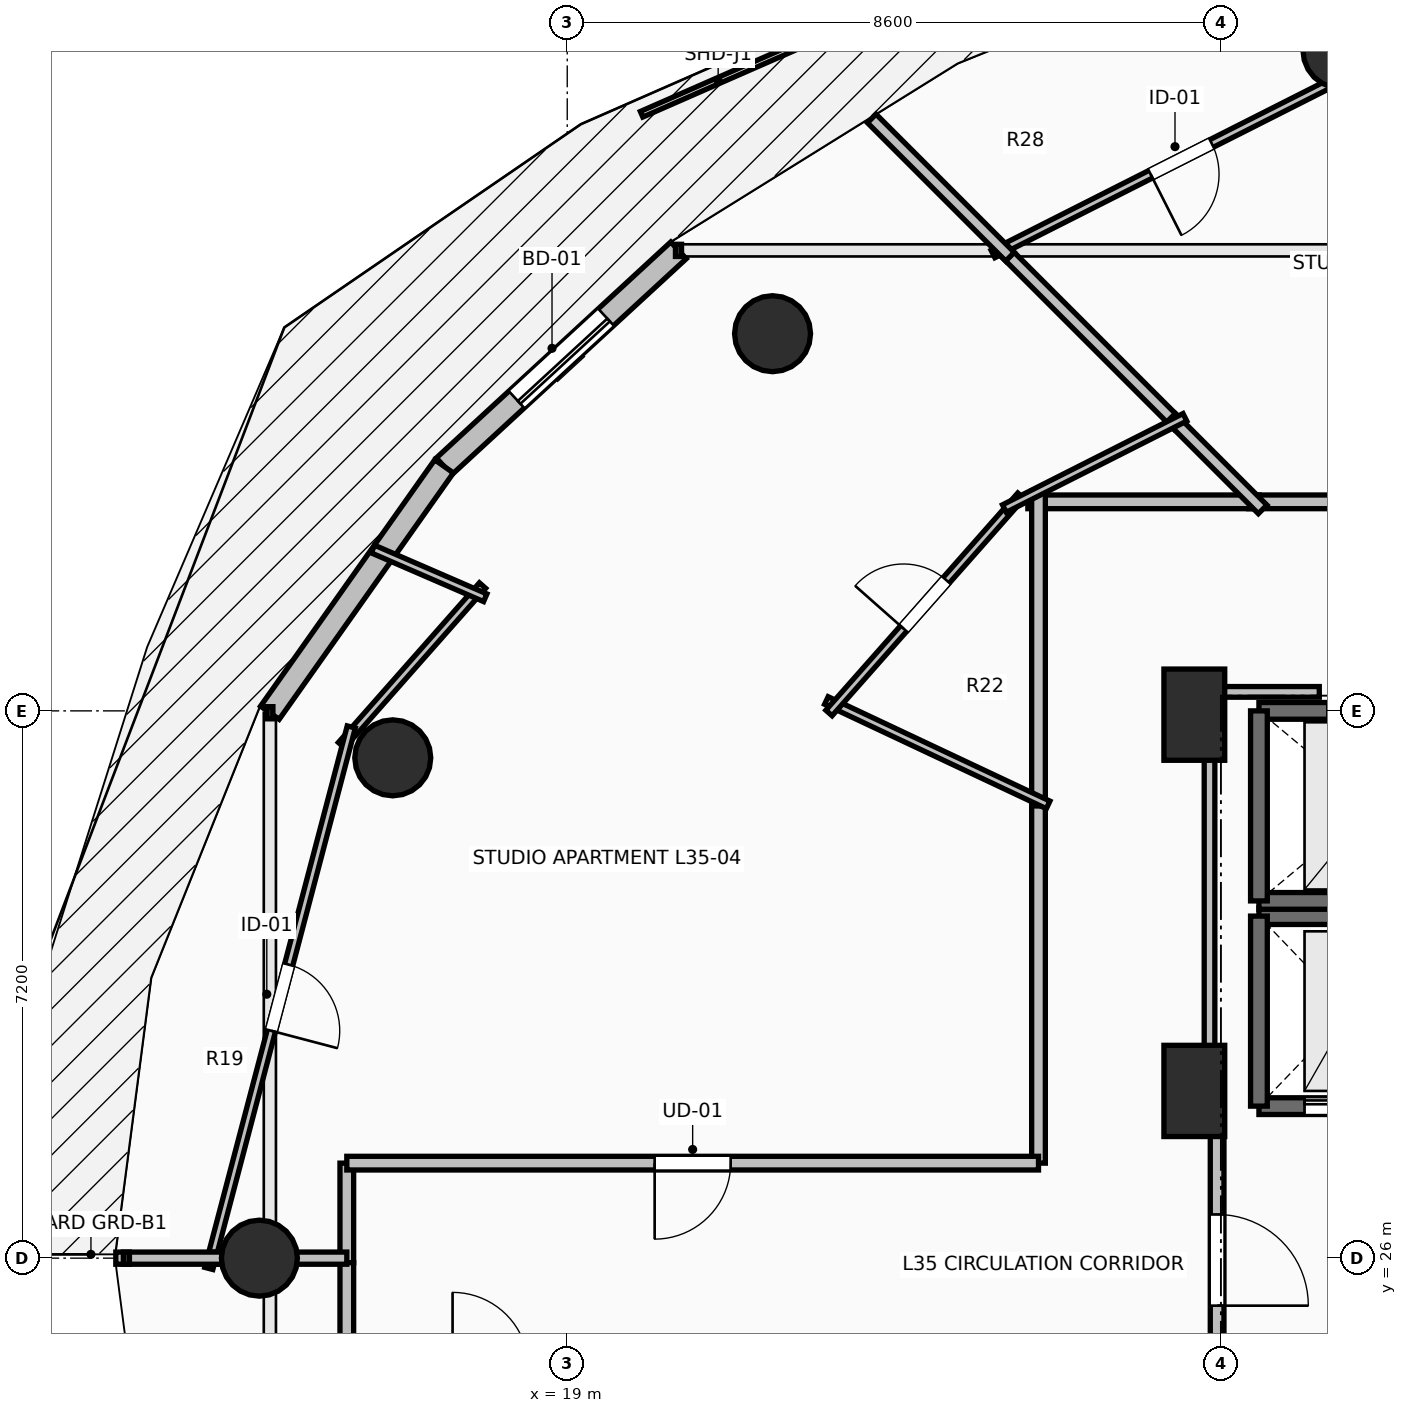
"""IFC4 building model, lengths in metres.
Left out: names, types, materials, properties, quantities, classifications, styles, units other than length and angle.
Written with IfcOpenShell. Run it as: python <this file> out.ifc"""

import sys

from ifc_helpers import new_model, si_unit, direction, frame, frame_2d, origin, origin_2d, place, context, subcontext, project, spatial, rectangle, circle, extrude, element, fill, save


model = new_model("IFC4")
c1 = context("Model", 3, precision=1e-05, world=origin(), true_north=direction((0.0, 1.0)))
c2 = subcontext(c1, "Body", "Model", "MODEL_VIEW")
j1 = project(units=[si_unit("LENGTHUNIT", "METRE"), si_unit("PLANEANGLEUNIT", "RADIAN")], contexts=[c1])
p1 = place(None, origin())
s1 = spatial("IfcSite", under=j1, at=p1, CompositionType="ELEMENT")
p2 = place(p1, origin())
s2 = spatial("IfcBuilding", under=s1, at=p2, CompositionType="ELEMENT")
p3 = place(p2, frame((0.0, 0.0, 132.6)))
s3 = spatial("IfcBuildingStorey", under=s2, at=p3, CompositionType="ELEMENT", Elevation=132.6)
for number, where, z_axis, x_axis in (
    (1, (29.179, 41.891, 0.0), (0.0, 0.0, 1.0), (-0.383, 0.924, 0.0)),
    (2, (21.701, 38.162, 0.0), (0.0, 0.0, 1.0), (-0.707, 0.707, 0.0)),
    (3, (16.705, 32.582, 0.0), (0.0, 0.0, 1.0), (-0.924, 0.383, 0.0)),
    (4, (14.95, 26.0, 0.0), (0.0, 0.0, 1.0), (-1.0, 0.0, 0.0)),
):
    element("IfcColumn", number, at=place(p3, frame(where, z_axis=z_axis, x_axis=x_axis)), inside=s3, PredefinedType="COLUMN", context=c2, shape_type="SweptSolid", body=[
        extrude(circle(Radius=0.5, at=origin_2d()), origin(), (0.0, 0.0, 1.0), 3.5),
    ])
for number, where, z_axis, x_axis in (
    (5, (27.25, 28.2, 0.0), (0.0, 0.0, 1.0), (1.0, 0.0, 0.0)),
    (6, (27.25, 33.15, 0.0), (0.0, 0.0, 1.0), (1.0, 0.0, 0.0)),
):
    element("IfcColumn", number, at=place(p3, frame(where, z_axis=z_axis, x_axis=x_axis)), inside=s3, PredefinedType="PILASTER", context=c2, shape_type="SweptSolid", body=[
        extrude(rectangle(XDim=0.8, YDim=1.2, at=origin_2d()), origin(), (0.0, 0.0, 1.0), 3.5),
    ])
p4 = place(p3, frame((20.464, 39.258, 0.0), z_axis=(0.0, 0.0, 1.0), x_axis=(-0.735477154165, -0.677549522693, 0.0)))
e7 = element("IfcWall", 7, at=p4, inside=s3, PredefinedType="STANDARD", context=c2, shape_type="SweptSolid", body=[
    extrude(rectangle(XDim=4.194, YDim=0.3, at=frame_2d((2.097, 0.0))), origin(), (0.0, 0.0, 1.0), 3.24),
])
p5 = place(p4, frame((1.297, 0.0, 0.0)))
e8 = element("IfcOpeningElement", 8, at=p5, cuts=e7, PredefinedType="OPENING", context=c2, shape_type="SweptSolid", body=[
    extrude(rectangle(XDim=1.6, YDim=2.3, at=frame_2d((0.8, 1.15))), frame((0.0, 0.165, 0.0), z_axis=(0.0, -1.0, 0.0), x_axis=(1.0, 0.0, 0.0)), (0.0, 0.0, 1.0), 0.33),
])
p6 = place(p3, frame((17.38, 36.417, 0.0), z_axis=(0.0, 0.0, 1.0), x_axis=(-0.577269753207, -0.816553508371, 0.0)))
e9 = element("IfcWall", 9, at=p6, inside=s3, PredefinedType="STANDARD", context=c2, shape_type="SweptSolid", body=[
    extrude(rectangle(XDim=3.97, YDim=0.3, at=frame_2d((1.985, 0.0))), origin(), (0.0, 0.0, 1.0), 3.24),
])
p7 = place(p3, frame((28.1, 28.0, 0.0), z_axis=(0.0, 0.0, 1.0), x_axis=(1.0, 0.0, 0.0)))
e10 = element("IfcWall", 10, at=p7, inside=s3, PredefinedType="SHEAR", context=c2, shape_type="SweptSolid", body=[
    extrude(rectangle(XDim=2.4, YDim=0.22, at=frame_2d((1.2, 0.0))), origin(), (0.0, 0.0, 1.0), 3.24),
])
p8 = place(p7, frame((0.6, 0.0, 0.0)))
e11 = element("IfcOpeningElement", 11, at=p8, cuts=e10, PredefinedType="OPENING", context=c2, shape_type="SweptSolid", body=[
    extrude(rectangle(XDim=1.2, YDim=2.2, at=frame_2d((0.6, 1.1))), frame((0.0, 0.125, 0.0), z_axis=(0.0, -1.0, 0.0), x_axis=(1.0, 0.0, 0.0)), (0.0, 0.0, 1.0), 0.25),
])
p9 = place(p3, frame((30.5, 30.5, 0.0), z_axis=(0.0, 0.0, 1.0), x_axis=(-1.0, 0.0, 0.0)))
e12 = element("IfcWall", 12, at=p9, inside=s3, PredefinedType="SHEAR", context=c2, shape_type="SweptSolid", body=[
    extrude(rectangle(XDim=2.4, YDim=0.22, at=frame_2d((1.2, 0.0))), origin(), (0.0, 0.0, 1.0), 3.24),
])
p10 = place(p3, frame((28.1, 30.5, 0.0), z_axis=(0.0, 0.0, 1.0), x_axis=(0.0, -1.0, 0.0)))
e13 = element("IfcWall", 13, at=p10, inside=s3, PredefinedType="SHEAR", context=c2, shape_type="SweptSolid", body=[
    extrude(rectangle(XDim=2.5, YDim=0.22, at=frame_2d((1.25, 0.0))), origin(), (0.0, 0.0, 1.0), 3.24),
])
p11 = place(p3, frame((28.1, 30.7, 0.0), z_axis=(0.0, 0.0, 1.0), x_axis=(1.0, 0.0, 0.0)))
e14 = element("IfcWall", 14, at=p11, inside=s3, PredefinedType="SOLIDWALL", context=c2, shape_type="SweptSolid", body=[
    extrude(rectangle(XDim=3.0, YDim=0.22, at=frame_2d((1.5, 0.0))), origin(), (0.0, 0.0, 1.0), 3.24),
])
p12 = place(p3, frame((31.1, 33.2, 0.0), z_axis=(0.0, 0.0, 1.0), x_axis=(-1.0, 0.0, 0.0)))
e15 = element("IfcWall", 15, at=p12, inside=s3, PredefinedType="SOLIDWALL", context=c2, shape_type="SweptSolid", body=[
    extrude(rectangle(XDim=3.0, YDim=0.22, at=frame_2d((1.5, 0.0))), origin(), (0.0, 0.0, 1.0), 3.24),
])
p13 = place(p12, frame((0.9, 0.0, 0.0)))
e16 = element("IfcOpeningElement", 16, at=p13, cuts=e15, PredefinedType="OPENING", context=c2, shape_type="SweptSolid", body=[
    extrude(rectangle(XDim=1.2, YDim=2.2, at=frame_2d((0.6, 1.1))), frame((0.0, 0.125, 0.0), z_axis=(0.0, -1.0, 0.0), x_axis=(1.0, 0.0, 0.0)), (0.0, 0.0, 1.0), 0.25),
])
p14 = place(p3, frame((28.1, 33.2, 0.0), z_axis=(0.0, 0.0, 1.0), x_axis=(0.0, -1.0, 0.0)))
e17 = element("IfcWall", 17, at=p14, inside=s3, PredefinedType="SOLIDWALL", context=c2, shape_type="SweptSolid", body=[
    extrude(rectangle(XDim=2.5, YDim=0.22, at=frame_2d((1.25, 0.0))), origin(), (0.0, 0.0, 1.0), 3.24),
])
p15 = place(p3, frame((27.55, 28.0, 0.0), z_axis=(0.0, 0.0, 1.0), x_axis=(0.0, -1.0, 0.0)))
e18 = element("IfcWall", 18, at=p15, inside=s3, PredefinedType="PARTITIONING", context=c2, shape_type="SweptSolid", body=[
    extrude(rectangle(XDim=4.05, YDim=0.18, at=frame_2d((2.025, 0.0))), origin(), (0.0, 0.0, 1.0), 3.24),
])
p16 = place(p15, frame((1.425, 0.0, 0.0)))
e19 = element("IfcOpeningElement", 19, at=p16, cuts=e18, PredefinedType="OPENING", context=c2, shape_type="SweptSolid", body=[
    extrude(rectangle(XDim=1.2, YDim=2.15, at=frame_2d((0.6, 1.075))), frame((0.0, 0.105, 0.0), z_axis=(0.0, -1.0, 0.0), x_axis=(1.0, 0.0, 0.0)), (0.0, 0.0, 1.0), 0.21),
])
p17 = place(p3, frame((34.478, 35.95, 0.0), z_axis=(0.0, 0.0, 1.0), x_axis=(-1.0, 0.0, 0.0)))
e20 = element("IfcWall", 20, at=p17, inside=s3, PredefinedType="PARTITIONING", context=c2, shape_type="SweptSolid", body=[
    extrude(rectangle(XDim=6.513, YDim=0.18, at=frame_2d((3.256, 0.0))), origin(), (0.0, 0.0, 1.0), 2.432),
])
p18 = place(p17, frame((2.757, 0.0, 0.0)))
e21 = element("IfcOpeningElement", 21, at=p18, cuts=e20, PredefinedType="OPENING", context=c2, shape_type="SweptSolid", body=[
    extrude(rectangle(XDim=1.0, YDim=2.15, at=frame_2d((0.5, 1.075))), frame((0.0, 0.105, 0.0), z_axis=(0.0, -1.0, 0.0), x_axis=(1.0, 0.0, 0.0)), (0.0, 0.0, 1.0), 0.21),
])
p19 = place(p3, frame((16.1, 27.25, 0.0), z_axis=(0.0, 0.0, 1.0), x_axis=(0.0, -1.0, 0.0)))
e22 = element("IfcWall", 22, at=p19, inside=s3, PredefinedType="PARTITIONING", context=c2, shape_type="SweptSolid", body=[
    extrude(rectangle(XDim=1.31, YDim=0.18, at=frame_2d((0.655, 0.0))), origin(), (0.0, 0.0, 1.0), 2.432),
])
p20 = place(p3, frame((25.2, 32.089, 0.0), z_axis=(0.0, 0.0, 1.0), x_axis=(0.0, -1.0, 0.0)))
e23 = element("IfcWall", 23, at=p20, inside=s3, PredefinedType="PARTITIONING", context=c2, shape_type="SweptSolid", body=[
    extrude(rectangle(XDim=4.839, YDim=0.18, at=frame_2d((2.419, 0.0))), origin(), (0.0, 0.0, 1.0), 2.432),
])
p21 = place(p3, frame((25.2, 27.25, 0.0), z_axis=(0.0, 0.0, 1.0), x_axis=(-1.0, 0.0, 0.0)))
e24 = element("IfcWall", 24, at=p21, inside=s3, PredefinedType="PARTITIONING", context=c2, shape_type="SweptSolid", body=[
    extrude(rectangle(XDim=9.1, YDim=0.18, at=frame_2d((4.55, 0.0))), origin(), (0.0, 0.0, 1.0), 2.432),
])
p22 = place(p21, frame((4.05, 0.0, 0.0)))
e25 = element("IfcOpeningElement", 25, at=p22, cuts=e24, PredefinedType="OPENING", context=c2, shape_type="SweptSolid", body=[
    extrude(rectangle(XDim=1.0, YDim=2.15, at=frame_2d((0.5, 1.075))), frame((0.0, 0.105, 0.0), z_axis=(0.0, -1.0, 0.0), x_axis=(1.0, 0.0, 0.0)), (0.0, 0.0, 1.0), 0.21),
])
p23 = place(p3, frame((28.105, 35.95, 0.0), z_axis=(0.0, 0.0, 1.0), x_axis=(-1.0, 0.0, 0.0)))
e26 = element("IfcWall", 26, at=p23, inside=s3, PredefinedType="PARTITIONING", context=c2, shape_type="SweptSolid", body=[
    extrude(rectangle(XDim=3.045, YDim=0.18, at=frame_2d((1.522, 0.0))), origin(), (0.0, 0.0, 1.0), 2.432),
])
p24 = place(p3, frame((25.2, 36.09, 0.0), z_axis=(0.0, 0.0, 1.0), x_axis=(0.0, -1.0, 0.0)))
e27 = element("IfcWall", 27, at=p24, inside=s3, PredefinedType="PARTITIONING", context=c2, shape_type="SweptSolid", body=[
    extrude(rectangle(XDim=4.141, YDim=0.18, at=frame_2d((2.071, 0.0))), origin(), (0.0, 0.0, 1.0), 2.432),
])
p25 = place(p3, frame((16.1, 25.94, 0.0), z_axis=(0.0, 0.0, 1.0), x_axis=(0.0, -1.0, 0.0)))
e28 = element("IfcWall", 28, at=p25, inside=s3, PredefinedType="PARTITIONING", context=c2, shape_type="SweptSolid", body=[
    extrude(rectangle(XDim=1.39, YDim=0.18, at=frame_2d((0.695, 0.0))), origin(), (0.0, 0.0, 1.0), 2.432),
])
p26 = place(p3, frame((29.553, 41.714, 0.0), z_axis=(0.0, 0.0, 1.0), x_axis=(-0.892438454993, -0.451169152369, 0.0)))
e29 = element("IfcWall", 29, at=p26, inside=s3, PredefinedType="PARTITIONING", context=c2, shape_type="SweptSolid", body=[
    extrude(rectangle(XDim=5.549, YDim=0.11, at=frame_2d((2.774, 0.0))), origin(), (0.0, 0.0, 1.0), 2.432),
])
p27 = place(p26, frame((2.324, 0.0, 0.0)))
e30 = element("IfcOpeningElement", 30, at=p27, cuts=e29, PredefinedType="OPENING", context=c2, shape_type="SweptSolid", body=[
    extrude(rectangle(XDim=0.9, YDim=2.1, at=frame_2d((0.45, 1.05))), frame((0.0, 0.07, 0.0), z_axis=(0.0, -1.0, 0.0), x_axis=(1.0, 0.0, 0.0)), (0.0, 0.0, 1.0), 0.14),
])
p28 = place(p3, frame((24.726, 39.274, 0.0), z_axis=(0.0, 0.0, 1.0), x_axis=(0.707106781187, -0.707106781187, 0.0)))
e31 = element("IfcWall", 31, at=p28, inside=s3, PredefinedType="PARTITIONING", context=c2, shape_type="SweptSolid", body=[
    extrude(rectangle(XDim=3.277, YDim=0.16, at=frame_2d((1.638, 0.0))), origin(), (0.0, 0.0, 1.0), 2.874),
])
p29 = place(p3, frame((26.944, 37.056, 0.0), z_axis=(0.0, 0.0, 1.0), x_axis=(0.707106781187, -0.707106781187, 0.0)))
e32 = element("IfcWall", 32, at=p29, inside=s3, PredefinedType="PARTITIONING", context=c2, shape_type="SweptSolid", body=[
    extrude(rectangle(XDim=1.704, YDim=0.16, at=frame_2d((0.852, 0.0))), origin(), (0.0, 0.0, 1.0), 2.432),
])
p30 = place(p3, frame((23.006, 40.994, 0.0), z_axis=(0.0, 0.0, 1.0), x_axis=(0.707106781187, -0.707106781187, 0.0)))
e33 = element("IfcWall", 33, at=p30, inside=s3, PredefinedType="PARTITIONING", context=c2, shape_type="SweptSolid", body=[
    extrude(rectangle(XDim=2.572, YDim=0.16, at=frame_2d((1.286, 0.0))), origin(), (0.0, 0.0, 1.0), 2.728),
])
p31 = place(p3, frame((25.327, 31.963, 0.0), z_axis=(0.0, 0.0, 1.0), x_axis=(-0.904775800467, 0.425888190596, 0.0)))
e34 = element("IfcWall", 34, at=p31, inside=s3, PredefinedType="PARTITIONING", context=c2, shape_type="SweptSolid", body=[
    extrude(rectangle(XDim=3.225, YDim=0.11, at=frame_2d((1.612, 0.0))), origin(), (0.0, 0.0, 1.0), 2.922),
])
p32 = place(p3, frame((22.443, 33.172, 0.0), z_axis=(0.0, 0.0, 1.0), x_axis=(0.662199468358, 0.749327607997, 0.0)))
e35 = element("IfcWall", 35, at=p32, inside=s3, PredefinedType="PARTITIONING", context=c2, shape_type="SweptSolid", body=[
    extrude(rectangle(XDim=3.814, YDim=0.11, at=frame_2d((1.907, 0.0))), origin(), (0.0, 0.0, 1.0), 2.432),
])
p33 = place(p32, frame((1.482, 0.0, 0.0)))
e36 = element("IfcOpeningElement", 36, at=p33, cuts=e35, PredefinedType="OPENING", context=c2, shape_type="SweptSolid", body=[
    extrude(rectangle(XDim=0.85, YDim=2.1, at=frame_2d((0.425, 1.05))), frame((0.0, 0.07, 0.0), z_axis=(0.0, -1.0, 0.0), x_axis=(1.0, 0.0, 0.0)), (0.0, 0.0, 1.0), 0.14),
])
p34 = place(p3, frame((24.751, 35.862, 0.0), z_axis=(0.0, 0.0, 1.0), x_axis=(0.892455114256, 0.451136197882, 0.0)))
e37 = element("IfcWall", 37, at=p34, inside=s3, PredefinedType="PARTITIONING", context=c2, shape_type="SweptSolid", body=[
    extrude(rectangle(XDim=2.661, YDim=0.11, at=frame_2d((1.331, 0.0))), origin(), (0.0, 0.0, 1.0), 3.24),
])
p35 = place(p3, frame((17.886, 34.849, 0.0), z_axis=(0.0, 0.0, 1.0), x_axis=(-0.661981664989, -0.749520029898, 0.0)))
e38 = element("IfcWall", 38, at=p35, inside=s3, PredefinedType="PARTITIONING", context=c2, shape_type="SweptSolid", body=[
    extrude(rectangle(XDim=2.803, YDim=0.11, at=frame_2d((1.401, 0.0))), origin(), (0.0, 0.0, 1.0), 3.24),
])
p36 = place(p3, frame((16.159, 32.988, 0.0), z_axis=(0.0, 0.0, 1.0), x_axis=(-0.254441093922, -0.967088274008, 0.0)))
e39 = element("IfcWall", 39, at=p36, inside=s3, PredefinedType="PARTITIONING", context=c2, shape_type="SweptSolid", body=[
    extrude(rectangle(XDim=7.366, YDim=0.11, at=frame_2d((3.683, 0.0))), origin(), (0.0, 0.0, 1.0), 3.24),
])
p37 = place(p36, frame((3.233, 0.0, 0.0)))
e40 = element("IfcOpeningElement", 40, at=p37, cuts=e39, PredefinedType="OPENING", context=c2, shape_type="SweptSolid", body=[
    extrude(rectangle(XDim=0.9, YDim=2.1, at=frame_2d((0.45, 1.05))), frame((0.0, 0.07, 0.0), z_axis=(0.0, -1.0, 0.0), x_axis=(1.0, 0.0, 0.0)), (0.0, 0.0, 1.0), 0.14),
])
p38 = place(p3, frame((16.444, 35.329, 0.0), z_axis=(0.0, 0.0, 1.0), x_axis=(0.917553781871, -0.397611691698, 0.0)))
e41 = element("IfcWall", 41, at=p38, inside=s3, PredefinedType="PARTITIONING", context=c2, shape_type="SweptSolid", body=[
    extrude(rectangle(XDim=1.611, YDim=0.11, at=frame_2d((0.805, 0.0))), origin(), (0.0, 0.0, 1.0), 3.24),
])
p39 = place(p3, frame((14.32, 26.0, 0.0), z_axis=(0.0, 0.0, 1.0), x_axis=(1.0, 0.0, 0.0)))
e42 = element("IfcWall", 42, at=p39, inside=s3, PredefinedType="PARTITIONING", context=c2, shape_type="SweptSolid", body=[
    extrude(rectangle(XDim=1.78, YDim=0.16, at=frame_2d((0.89, 0.0))), origin(), (0.0, 0.0, 1.0), 2.432),
])
p40 = place(p3, frame((13.061, 26.0, 0.0), z_axis=(0.0, 0.0, 1.0), x_axis=(1.0, 0.0, 0.0)))
e43 = element("IfcWall", 43, at=p40, inside=s3, PredefinedType="PARTITIONING", context=c2, shape_type="SweptSolid", body=[
    extrude(rectangle(XDim=1.399, YDim=0.16, at=frame_2d((0.699, 0.0))), origin(), (0.0, 0.0, 1.0), 3.24),
])
p41 = place(p3, frame((28.894, 33.45, 0.0), z_axis=(0.0, 0.0, 1.0), x_axis=(-1.0, 0.0, 0.0)))
e44 = element("IfcWall", 44, at=p41, inside=s3, PredefinedType="PARTITIONING", context=c2, shape_type="SweptSolid", body=[
    extrude(rectangle(XDim=1.444, YDim=0.14, at=frame_2d((0.722, 0.0))), origin(), (0.0, 0.0, 1.0), 2.432),
])
p42 = place(p3, frame((27.45, 33.45, 0.0), z_axis=(0.0, 0.0, 1.0), x_axis=(0.0, -1.0, 0.0)))
e45 = element("IfcWall", 45, at=p42, inside=s3, PredefinedType="PARTITIONING", context=c2, shape_type="SweptSolid", body=[
    extrude(rectangle(XDim=5.254, YDim=0.14, at=frame_2d((2.627, 0.0))), origin(), (0.0, 0.0, 1.0), 2.432),
])
p43 = place(p5, origin())
e46 = element("IfcDoor", 46, at=p43, inside=s3, OperationType="SLIDING_TO_LEFT", PredefinedType="DOOR", context=c2, shape_type="SweptSolid", body=[
    extrude(rectangle(XDim=1.6, YDim=2.3, at=frame_2d((0.8, 1.15))), frame((0.0, 0.025, 0.0), z_axis=(0.0, -1.0, 0.0), x_axis=(1.0, 0.0, 0.0)), (0.0, 0.0, 1.0), 0.05),
])
fill(e8, e46)
p44 = place(p8, origin())
e47 = element("IfcDoor", 47, at=p44, inside=s3, OperationType="SLIDING_TO_LEFT", PredefinedType="DOOR", context=c2, shape_type="SweptSolid", body=[
    extrude(rectangle(XDim=1.2, YDim=2.2, at=frame_2d((0.6, 1.1))), frame((0.0, 0.025, 0.0), z_axis=(0.0, -1.0, 0.0), x_axis=(1.0, 0.0, 0.0)), (0.0, 0.0, 1.0), 0.05),
])
fill(e11, e47)
p45 = place(p13, origin())
e48 = element("IfcDoor", 48, at=p45, inside=s3, OperationType="SLIDING_TO_LEFT", PredefinedType="DOOR", context=c2, shape_type="SweptSolid", body=[
    extrude(rectangle(XDim=1.2, YDim=2.2, at=frame_2d((0.6, 1.1))), frame((0.0, 0.025, 0.0), z_axis=(0.0, -1.0, 0.0), x_axis=(1.0, 0.0, 0.0)), (0.0, 0.0, 1.0), 0.05),
])
fill(e16, e48)
p46 = place(p16, origin())
e49 = element("IfcDoor", 49, at=p46, inside=s3, OperationType="SINGLE_SWING_RIGHT", PredefinedType="DOOR", context=c2, shape_type="SweptSolid", body=[
    extrude(rectangle(XDim=1.2, YDim=2.15, at=frame_2d((0.6, 1.075))), frame((0.0, 0.025, 0.0), z_axis=(0.0, -1.0, 0.0), x_axis=(1.0, 0.0, 0.0)), (0.0, 0.0, 1.0), 0.05),
])
fill(e19, e49)
p47 = place(p22, origin())
e50 = element("IfcDoor", 50, at=p47, inside=s3, OperationType="SINGLE_SWING_RIGHT", PredefinedType="DOOR", context=c2, shape_type="SweptSolid", body=[
    extrude(rectangle(XDim=1.0, YDim=2.15, at=frame_2d((0.5, 1.075))), frame((0.0, 0.025, 0.0), z_axis=(0.0, -1.0, 0.0), x_axis=(1.0, 0.0, 0.0)), (0.0, 0.0, 1.0), 0.05),
])
fill(e25, e50)
p48 = place(p27, origin())
e51 = element("IfcDoor", 51, at=p48, inside=s3, OperationType="SINGLE_SWING_RIGHT", PredefinedType="DOOR", context=c2, shape_type="SweptSolid", body=[
    extrude(rectangle(XDim=0.9, YDim=2.1, at=frame_2d((0.45, 1.05))), frame((0.0, 0.025, 0.0), z_axis=(0.0, -1.0, 0.0), x_axis=(1.0, 0.0, 0.0)), (0.0, 0.0, 1.0), 0.05),
])
fill(e30, e51)
p49 = place(p33, origin())
e52 = element("IfcDoor", 52, at=p49, inside=s3, OperationType="SINGLE_SWING_LEFT", PredefinedType="DOOR", context=c2, shape_type="SweptSolid", body=[
    extrude(rectangle(XDim=0.85, YDim=2.1, at=frame_2d((0.425, 1.05))), frame((0.0, 0.025, 0.0), z_axis=(0.0, -1.0, 0.0), x_axis=(1.0, 0.0, 0.0)), (0.0, 0.0, 1.0), 0.05),
])
fill(e36, e52)
p50 = place(p37, origin())
e53 = element("IfcDoor", 53, at=p50, inside=s3, OperationType="SINGLE_SWING_RIGHT", PredefinedType="DOOR", context=c2, shape_type="SweptSolid", body=[
    extrude(rectangle(XDim=0.9, YDim=2.1, at=frame_2d((0.45, 1.05))), frame((0.0, 0.025, 0.0), z_axis=(0.0, -1.0, 0.0), x_axis=(1.0, 0.0, 0.0)), (0.0, 0.0, 1.0), 0.05),
])
fill(e40, e53)
save(model, sys.argv[1])
